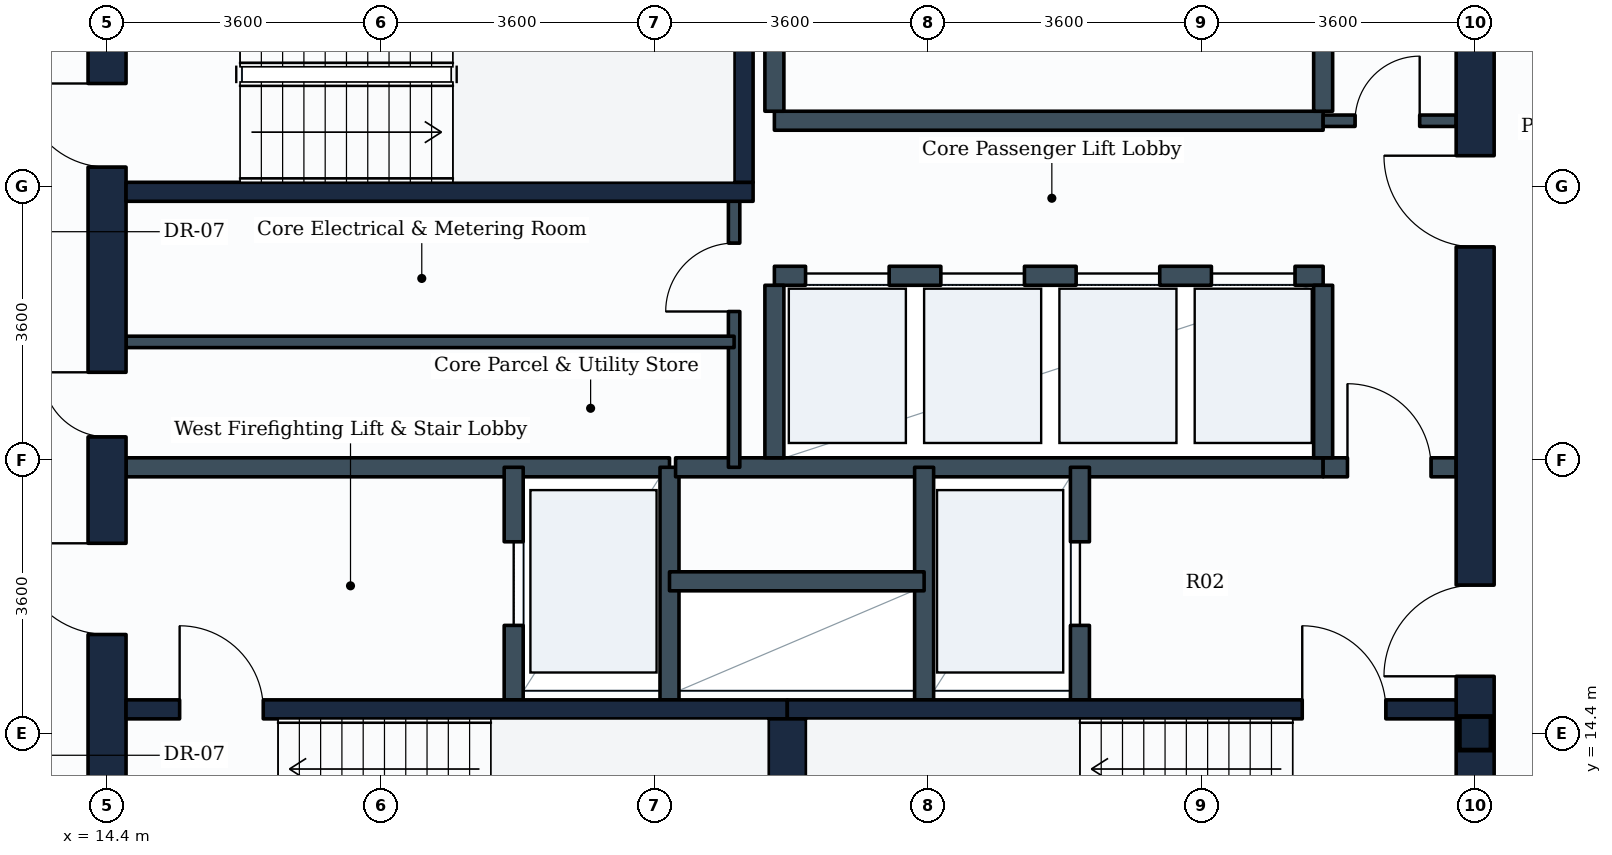
"""IFC4 building model, lengths in metres.
Left out: names, types, materials, properties, quantities, classifications, styles, units other than length and angle.
Written with IfcOpenShell. Run it as: python <this file> out.ifc"""

import sys

from ifc_helpers import new_model, si_unit, direction, frame, frame_2d, origin, origin_2d, place, context, subcontext, project, spatial, rectangle, i_section, extrude, element, fill, save


model = new_model("IFC4")
c1 = context("Model", 3, precision=1e-05, world=origin(), true_north=direction((0.0, 1.0)))
c2 = subcontext(c1, "Body", "Model", "MODEL_VIEW")
j1 = project(units=[si_unit("LENGTHUNIT", "METRE"), si_unit("PLANEANGLEUNIT", "RADIAN")], contexts=[c1])
p1 = place(None, origin())
s1 = spatial("IfcSite", under=j1, at=p1, CompositionType="ELEMENT")
p2 = place(p1, origin())
s2 = spatial("IfcBuilding", under=s1, at=p2, CompositionType="ELEMENT")
p3 = place(p2, frame((0.0, 0.0, 142.8)))
s3 = spatial("IfcBuildingStorey", under=s2, at=p3, CompositionType="ELEMENT", Elevation=142.8)
p4 = place(p3, frame((32.4, 14.4, 0.0), z_axis=(0.0, 0.0, 1.0), x_axis=(1.0, 0.0, 0.0)))
e1 = element("IfcColumn", 1, at=p4, inside=s3, PredefinedType="COLUMN", context=c2, shape_type="SweptSolid", body=[
    extrude(i_section(OverallWidth=0.416, OverallDepth=0.442, WebThickness=0.025, FlangeThickness=0.041, FilletRadius=0.015, at=origin_2d()), origin(), (0.0, 0.0, 1.0), 3.8),
])
p5 = place(p3, frame((14.4, 10.8, 0.0), z_axis=(0.0, 0.0, 1.0), x_axis=(0.0, 1.0, 0.0)))
e2 = element("IfcWall", 2, at=p5, inside=s3, PredefinedType="SHEAR", context=c2, shape_type="SweptSolid", body=[
    extrude(rectangle(XDim=14.4, YDim=0.5, at=frame_2d((7.2, 0.0))), origin(), (0.0, 0.0, 1.0), 3.55),
])
p6 = place(p5, frame((11.05, 0.0, 0.0)))
e3 = element("IfcOpeningElement", 3, at=p6, cuts=e2, PredefinedType="OPENING", context=c2, shape_type="SweptSolid", body=[
    extrude(rectangle(XDim=1.1, YDim=2.1, at=frame_2d((0.55, 1.05))), frame((0.0, 0.26, 0.0), z_axis=(0.0, -1.0, 0.0), x_axis=(1.0, 0.0, 0.0)), (0.0, 0.0, 1.0), 0.52),
])
p7 = place(p5, frame((4.9, 0.0, 0.0)))
e4 = element("IfcOpeningElement", 4, at=p7, cuts=e2, PredefinedType="OPENING", context=c2, shape_type="SweptSolid", body=[
    extrude(rectangle(XDim=1.2, YDim=2.1, at=frame_2d((0.6, 1.05))), frame((0.0, 0.26, 0.0), z_axis=(0.0, -1.0, 0.0), x_axis=(1.0, 0.0, 0.0)), (0.0, 0.0, 1.0), 0.52),
])
p8 = place(p5, frame((7.5, 0.0, 0.0)))
e5 = element("IfcOpeningElement", 5, at=p8, cuts=e2, PredefinedType="OPENING", context=c2, shape_type="SweptSolid", body=[
    extrude(rectangle(XDim=0.85, YDim=2.1, at=frame_2d((0.425, 1.05))), frame((0.0, 0.26, 0.0), z_axis=(0.0, -1.0, 0.0), x_axis=(1.0, 0.0, 0.0)), (0.0, 0.0, 1.0), 0.52),
])
p9 = place(p3, frame((32.4, 10.8, 0.0), z_axis=(0.0, 0.0, 1.0), x_axis=(0.0, 1.0, 0.0)))
e6 = element("IfcWall", 6, at=p9, inside=s3, PredefinedType="SHEAR", context=c2, shape_type="SweptSolid", body=[
    extrude(rectangle(XDim=14.4, YDim=0.5, at=frame_2d((7.2, 0.0))), origin(), (0.0, 0.0, 1.0), 3.55),
])
p10 = place(p9, frame((4.35, 0.0, 0.0)))
e7 = element("IfcOpeningElement", 7, at=p10, cuts=e6, PredefinedType="OPENING", context=c2, shape_type="SweptSolid", body=[
    extrude(rectangle(XDim=1.2, YDim=2.1, at=frame_2d((0.6, 1.05))), frame((0.0, 0.26, 0.0), z_axis=(0.0, -1.0, 0.0), x_axis=(1.0, 0.0, 0.0)), (0.0, 0.0, 1.0), 0.52),
])
p11 = place(p9, frame((10.0, 0.0, 0.0)))
e8 = element("IfcOpeningElement", 8, at=p11, cuts=e6, PredefinedType="OPENING", context=c2, shape_type="SweptSolid", body=[
    extrude(rectangle(XDim=1.2, YDim=2.1, at=frame_2d((0.6, 1.05))), frame((0.0, 0.26, 0.0), z_axis=(0.0, -1.0, 0.0), x_axis=(1.0, 0.0, 0.0)), (0.0, 0.0, 1.0), 0.52),
])
p12 = place(p3, frame((14.65, 14.715, 0.0), z_axis=(0.0, 0.0, 1.0), x_axis=(1.0, 0.0, 0.0)))
e9 = element("IfcWall", 9, at=p12, inside=s3, PredefinedType="SHEAR", context=c2, shape_type="SweptSolid", body=[
    extrude(rectangle(XDim=8.7, YDim=0.25, at=frame_2d((4.35, 0.0))), origin(), (0.0, 0.0, 1.0), 3.55),
])
p13 = place(p12, frame((0.705, 0.0, 0.0)))
e10 = element("IfcOpeningElement", 10, at=p13, cuts=e9, PredefinedType="OPENING", context=c2, shape_type="SweptSolid", body=[
    extrude(rectangle(XDim=1.1, YDim=2.1, at=frame_2d((0.55, 1.05))), frame((0.0, 0.135, 0.0), z_axis=(0.0, -1.0, 0.0), x_axis=(1.0, 0.0, 0.0)), (0.0, 0.0, 1.0), 0.27),
])
p14 = place(p3, frame((23.35, 14.715, 0.0), z_axis=(0.0, 0.0, 1.0), x_axis=(1.0, 0.0, 0.0)))
e11 = element("IfcWall", 11, at=p14, inside=s3, PredefinedType="SHEAR", context=c2, shape_type="SweptSolid", body=[
    extrude(rectangle(XDim=8.8, YDim=0.25, at=frame_2d((4.4, 0.0))), origin(), (0.0, 0.0, 1.0), 3.55),
])
p15 = place(p14, frame((6.775, 0.0, 0.0)))
e12 = element("IfcOpeningElement", 12, at=p15, cuts=e11, PredefinedType="OPENING", context=c2, shape_type="SweptSolid", body=[
    extrude(rectangle(XDim=1.1, YDim=2.1, at=frame_2d((0.55, 1.05))), frame((0.0, 0.135, 0.0), z_axis=(0.0, -1.0, 0.0), x_axis=(1.0, 0.0, 0.0)), (0.0, 0.0, 1.0), 0.27),
])
p16 = place(p3, frame((23.35, 11.75, 0.0), z_axis=(0.0, 0.0, 1.0), x_axis=(0.0, 1.0, 0.0)))
e13 = element("IfcWall", 13, at=p16, inside=s3, PredefinedType="SHEAR", context=c2, shape_type="SweptSolid", body=[
    extrude(rectangle(XDim=2.84, YDim=0.5, at=frame_2d((1.42, 0.0))), origin(), (0.0, 0.0, 1.0), 3.55),
])
p17 = place(p3, frame((14.65, 21.525, 0.0), z_axis=(0.0, 0.0, 1.0), x_axis=(1.0, 0.0, 0.0)))
e14 = element("IfcWall", 14, at=p17, inside=s3, PredefinedType="SHEAR", context=c2, shape_type="SweptSolid", body=[
    extrude(rectangle(XDim=8.25, YDim=0.25, at=frame_2d((4.125, 0.0))), origin(), (0.0, 0.0, 1.0), 3.55),
])
p18 = place(p3, frame((22.775, 21.65, 0.0), z_axis=(0.0, 0.0, 1.0), x_axis=(0.0, 1.0, 0.0)))
e15 = element("IfcWall", 15, at=p18, inside=s3, PredefinedType="SHEAR", context=c2, shape_type="SweptSolid", body=[
    extrude(rectangle(XDim=2.84, YDim=0.25, at=frame_2d((1.42, 0.0))), origin(), (0.0, 0.0, 1.0), 3.55),
])
p19 = place(p3, frame((14.65, 17.9, 0.0), z_axis=(0.0, 0.0, 1.0), x_axis=(1.0, 0.0, 0.0)))
e16 = element("IfcWall", 16, at=p19, inside=s3, PredefinedType="PARTITIONING", context=c2, shape_type="SweptSolid", body=[
    extrude(rectangle(XDim=7.15, YDim=0.25, at=frame_2d((3.575, 0.0))), origin(), (0.0, 0.0, 1.0), 3.535),
])
p20 = place(p3, frame((19.75, 14.84, 0.0), z_axis=(0.0, 0.0, 1.0), x_axis=(0.0, 1.0, 0.0)))
e17 = element("IfcWall", 17, at=p20, inside=s3, PredefinedType="PARTITIONING", context=c2, shape_type="SweptSolid", body=[
    extrude(rectangle(XDim=3.06, YDim=0.25, at=frame_2d((1.53, 0.0))), origin(), (0.0, 0.0, 1.0), 3.535),
])
p21 = place(p20, frame((0.98, 0.0, 0.0)))
e18 = element("IfcOpeningElement", 18, at=p21, cuts=e17, PredefinedType="OPENING", context=c2, shape_type="SweptSolid", body=[
    extrude(rectangle(XDim=1.1, YDim=2.1, at=frame_2d((0.55, 1.05))), frame((0.0, 0.135, 0.0), z_axis=(0.0, -1.0, 0.0), x_axis=(1.0, 0.0, 0.0)), (0.0, 0.0, 1.0), 0.27),
])
p22 = place(p3, frame((21.8, 14.84, 0.0), z_axis=(0.0, 0.0, 1.0), x_axis=(0.0, 1.0, 0.0)))
e19 = element("IfcWall", 19, at=p22, inside=s3, PredefinedType="PARTITIONING", context=c2, shape_type="SweptSolid", body=[
    extrude(rectangle(XDim=3.06, YDim=0.25, at=frame_2d((1.53, 0.0))), origin(), (0.0, 0.0, 1.0), 3.535),
])
p23 = place(p3, frame((21.88, 17.9, 0.0), z_axis=(0.0, 0.0, 1.0), x_axis=(1.0, 0.0, 0.0)))
e20 = element("IfcWall", 20, at=p23, inside=s3, PredefinedType="PARTITIONING", context=c2, shape_type="SweptSolid", body=[
    extrude(rectangle(XDim=8.52, YDim=0.25, at=frame_2d((4.26, 0.0))), origin(), (0.0, 0.0, 1.0), 3.535),
])
p24 = place(p3, frame((30.4, 17.9, 0.0), z_axis=(0.0, 0.0, 1.0), x_axis=(1.0, 0.0, 0.0)))
e21 = element("IfcWall", 21, at=p24, inside=s3, PredefinedType="PARTITIONING", context=c2, shape_type="SweptSolid", body=[
    extrude(rectangle(XDim=1.75, YDim=0.25, at=frame_2d((0.875, 0.0))), origin(), (0.0, 0.0, 1.0), 3.535),
])
p25 = place(p24, frame((0.32, 0.0, 0.0)))
e22 = element("IfcOpeningElement", 22, at=p25, cuts=e21, PredefinedType="OPENING", context=c2, shape_type="SweptSolid", body=[
    extrude(rectangle(XDim=1.1, YDim=2.1, at=frame_2d((0.55, 1.05))), frame((0.0, 0.135, 0.0), z_axis=(0.0, -1.0, 0.0), x_axis=(1.0, 0.0, 0.0)), (0.0, 0.0, 1.0), 0.27),
])
p26 = place(p3, frame((25.15, 14.84, 0.0), z_axis=(0.0, 0.0, 1.0), x_axis=(0.0, 1.0, 0.0)))
e23 = element("IfcWall", 23, at=p26, inside=s3, PredefinedType="PARTITIONING", context=c2, shape_type="SweptSolid", body=[
    extrude(rectangle(XDim=3.06, YDim=0.25, at=frame_2d((1.53, 0.0))), origin(), (0.0, 0.0, 1.0), 3.535),
])
p27 = place(p3, frame((27.2, 14.84, 0.0), z_axis=(0.0, 0.0, 1.0), x_axis=(0.0, 1.0, 0.0)))
e24 = element("IfcWall", 24, at=p27, inside=s3, PredefinedType="PARTITIONING", context=c2, shape_type="SweptSolid", body=[
    extrude(rectangle(XDim=3.06, YDim=0.25, at=frame_2d((1.53, 0.0))), origin(), (0.0, 0.0, 1.0), 3.535),
])
p28 = place(p27, frame((0.98, 0.0, 0.0)))
e25 = element("IfcOpeningElement", 25, at=p28, cuts=e24, PredefinedType="OPENING", context=c2, shape_type="SweptSolid", body=[
    extrude(rectangle(XDim=1.1, YDim=2.1, at=frame_2d((0.55, 1.05))), frame((0.0, 0.135, 0.0), z_axis=(0.0, -1.0, 0.0), x_axis=(1.0, 0.0, 0.0)), (0.0, 0.0, 1.0), 0.27),
])
p29 = place(p3, frame((21.8, 16.4, 0.0), z_axis=(0.0, 0.0, 1.0), x_axis=(1.0, 0.0, 0.0)))
e26 = element("IfcWall", 26, at=p29, inside=s3, PredefinedType="PARTITIONING", context=c2, shape_type="SweptSolid", body=[
    extrude(rectangle(XDim=3.35, YDim=0.25, at=frame_2d((1.675, 0.0))), origin(), (0.0, 0.0, 1.0), 3.535),
])
p30 = place(p3, frame((23.18, 20.42, 0.0), z_axis=(0.0, 0.0, 1.0), x_axis=(1.0, 0.0, 0.0)))
e27 = element("IfcWall", 27, at=p30, inside=s3, PredefinedType="PARTITIONING", context=c2, shape_type="SweptSolid", body=[
    extrude(rectangle(XDim=7.22, YDim=0.25, at=frame_2d((3.61, 0.0))), origin(), (0.0, 0.0, 1.0), 3.535),
])
p31 = place(p30, frame((0.41, 0.0, 0.0)))
e28 = element("IfcOpeningElement", 28, at=p31, cuts=e27, PredefinedType="OPENING", context=c2, shape_type="SweptSolid", body=[
    extrude(rectangle(XDim=1.1, YDim=2.1, at=frame_2d((0.55, 1.05))), frame((0.0, 0.135, 0.0), z_axis=(0.0, -1.0, 0.0), x_axis=(1.0, 0.0, 0.0)), (0.0, 0.0, 1.0), 0.27),
])
p32 = place(p30, frame((2.19, 0.0, 0.0)))
e29 = element("IfcOpeningElement", 29, at=p32, cuts=e27, PredefinedType="OPENING", context=c2, shape_type="SweptSolid", body=[
    extrude(rectangle(XDim=1.1, YDim=2.1, at=frame_2d((0.55, 1.05))), frame((0.0, 0.135, 0.0), z_axis=(0.0, -1.0, 0.0), x_axis=(1.0, 0.0, 0.0)), (0.0, 0.0, 1.0), 0.27),
])
p33 = place(p30, frame((3.97, 0.0, 0.0)))
e30 = element("IfcOpeningElement", 30, at=p33, cuts=e27, PredefinedType="OPENING", context=c2, shape_type="SweptSolid", body=[
    extrude(rectangle(XDim=1.1, YDim=2.1, at=frame_2d((0.55, 1.05))), frame((0.0, 0.135, 0.0), z_axis=(0.0, -1.0, 0.0), x_axis=(1.0, 0.0, 0.0)), (0.0, 0.0, 1.0), 0.27),
])
p34 = place(p30, frame((5.75, 0.0, 0.0)))
e31 = element("IfcOpeningElement", 31, at=p34, cuts=e27, PredefinedType="OPENING", context=c2, shape_type="SweptSolid", body=[
    extrude(rectangle(XDim=1.1, YDim=2.1, at=frame_2d((0.55, 1.05))), frame((0.0, 0.135, 0.0), z_axis=(0.0, -1.0, 0.0), x_axis=(1.0, 0.0, 0.0)), (0.0, 0.0, 1.0), 0.27),
])
for number, where, z_axis, x_axis in (
    (32, (23.18, 18.025, 0.0), (0.0, 0.0, 1.0), (0.0, 1.0, 0.0)),
    (33, (30.4, 18.025, 0.0), (0.0, 0.0, 1.0), (0.0, 1.0, 0.0)),
):
    element("IfcWall", number, at=place(p3, frame(where, z_axis=z_axis, x_axis=x_axis)), inside=s3, PredefinedType="PARTITIONING", context=c2, shape_type="SweptSolid", body=[
        extrude(rectangle(XDim=2.27, YDim=0.25, at=frame_2d((1.135, 0.0))), origin(), (0.0, 0.0, 1.0), 3.535),
    ])
p35 = place(p3, frame((23.18, 22.46, 0.0), z_axis=(0.0, 0.0, 1.0), x_axis=(1.0, 0.0, 0.0)))
e34 = element("IfcWall", 34, at=p35, inside=s3, PredefinedType="PARTITIONING", context=c2, shape_type="SweptSolid", body=[
    extrude(rectangle(XDim=7.22, YDim=0.25, at=frame_2d((3.61, 0.0))), origin(), (0.0, 0.0, 1.0), 3.535),
])
for number, where, z_axis, x_axis in (
    (35, (23.18, 22.585, 0.0), (0.0, 0.0, 1.0), (0.0, 1.0, 0.0)),
    (36, (30.4, 22.585, 0.0), (0.0, 0.0, 1.0), (0.0, 1.0, 0.0)),
):
    element("IfcWall", number, at=place(p3, frame(where, z_axis=z_axis, x_axis=x_axis)), inside=s3, PredefinedType="PARTITIONING", context=c2, shape_type="SweptSolid", body=[
        extrude(rectangle(XDim=2.315, YDim=0.25, at=frame_2d((1.157, 0.0))), origin(), (0.0, 0.0, 1.0), 3.535),
    ])
p36 = place(p3, frame((22.65, 17.9, 0.0), z_axis=(0.0, 0.0, 1.0), x_axis=(0.0, 1.0, 0.0)))
e37 = element("IfcWall", 37, at=p36, inside=s3, PredefinedType="PARTITIONING", context=c2, shape_type="SweptSolid", body=[
    extrude(rectangle(XDim=3.625, YDim=0.15, at=frame_2d((1.812, 0.0))), origin(), (0.0, 0.0, 1.0), 3.535),
])
p37 = place(p36, frame((2.05, 0.0, 0.0)))
e38 = element("IfcOpeningElement", 38, at=p37, cuts=e37, PredefinedType="OPENING", context=c2, shape_type="SweptSolid", body=[
    extrude(rectangle(XDim=0.9, YDim=2.1, at=frame_2d((0.45, 1.05))), frame((0.0, 0.085, 0.0), z_axis=(0.0, -1.0, 0.0), x_axis=(1.0, 0.0, 0.0)), (0.0, 0.0, 1.0), 0.17),
])
p38 = place(p3, frame((14.65, 19.55, 0.0), z_axis=(0.0, 0.0, 1.0), x_axis=(1.0, 0.0, 0.0)))
e39 = element("IfcWall", 39, at=p38, inside=s3, PredefinedType="PARTITIONING", context=c2, shape_type="SweptSolid", body=[
    extrude(rectangle(XDim=8.0, YDim=0.15, at=frame_2d((4.0, 0.0))), origin(), (0.0, 0.0, 1.0), 3.535),
])
p39 = place(p3, frame((30.4, 22.46, 0.0), z_axis=(0.0, 0.0, 1.0), x_axis=(1.0, 0.0, 0.0)))
e40 = element("IfcWall", 40, at=p39, inside=s3, PredefinedType="PARTITIONING", context=c2, shape_type="SweptSolid", body=[
    extrude(rectangle(XDim=1.75, YDim=0.15, at=frame_2d((0.875, 0.0))), origin(), (0.0, 0.0, 1.0), 3.535),
])
p40 = place(p39, frame((0.42, 0.0, 0.0)))
e41 = element("IfcOpeningElement", 41, at=p40, cuts=e40, PredefinedType="OPENING", context=c2, shape_type="SweptSolid", body=[
    extrude(rectangle(XDim=0.85, YDim=2.1, at=frame_2d((0.425, 1.05))), frame((0.0, 0.085, 0.0), z_axis=(0.0, -1.0, 0.0), x_axis=(1.0, 0.0, 0.0)), (0.0, 0.0, 1.0), 0.17),
])
p41 = place(p13, origin())
e42 = element("IfcDoor", 42, at=p41, inside=s3, OperationType="SINGLE_SWING_LEFT", PredefinedType="DOOR", context=c2, shape_type="SweptSolid", body=[
    extrude(rectangle(XDim=1.1, YDim=2.1, at=frame_2d((0.55, 1.05))), frame((0.0, 0.025, 0.0), z_axis=(0.0, -1.0, 0.0), x_axis=(1.0, 0.0, 0.0)), (0.0, 0.0, 1.0), 0.05),
])
fill(e10, e42)
p42 = place(p15, origin())
e43 = element("IfcDoor", 43, at=p42, inside=s3, OperationType="SINGLE_SWING_LEFT", PredefinedType="DOOR", context=c2, shape_type="SweptSolid", body=[
    extrude(rectangle(XDim=1.1, YDim=2.1, at=frame_2d((0.55, 1.05))), frame((0.0, 0.025, 0.0), z_axis=(0.0, -1.0, 0.0), x_axis=(1.0, 0.0, 0.0)), (0.0, 0.0, 1.0), 0.05),
])
fill(e12, e43)
p43 = place(p6, origin())
e44 = element("IfcDoor", 44, at=p43, inside=s3, OperationType="SINGLE_SWING_RIGHT", PredefinedType="DOOR", context=c2, shape_type="SweptSolid", body=[
    extrude(rectangle(XDim=1.1, YDim=2.1, at=frame_2d((0.55, 1.05))), frame((0.0, 0.025, 0.0), z_axis=(0.0, -1.0, 0.0), x_axis=(1.0, 0.0, 0.0)), (0.0, 0.0, 1.0), 0.05),
])
fill(e3, e44)
p44 = place(p21, origin())
e45 = element("IfcDoor", 45, at=p44, inside=s3, OperationType="SLIDING_TO_LEFT", PredefinedType="DOOR", context=c2, shape_type="SweptSolid", body=[
    extrude(rectangle(XDim=1.1, YDim=2.1, at=frame_2d((0.55, 1.05))), frame((0.0, 0.025, 0.0), z_axis=(0.0, -1.0, 0.0), x_axis=(1.0, 0.0, 0.0)), (0.0, 0.0, 1.0), 0.05),
])
fill(e18, e45)
p45 = place(p28, origin())
e46 = element("IfcDoor", 46, at=p45, inside=s3, OperationType="SLIDING_TO_LEFT", PredefinedType="DOOR", context=c2, shape_type="SweptSolid", body=[
    extrude(rectangle(XDim=1.1, YDim=2.1, at=frame_2d((0.55, 1.05))), frame((0.0, 0.025, 0.0), z_axis=(0.0, -1.0, 0.0), x_axis=(1.0, 0.0, 0.0)), (0.0, 0.0, 1.0), 0.05),
])
fill(e25, e46)
p46 = place(p7, origin())
e47 = element("IfcDoor", 47, at=p46, inside=s3, OperationType="SINGLE_SWING_RIGHT", PredefinedType="DOOR", context=c2, shape_type="SweptSolid", body=[
    extrude(rectangle(XDim=1.2, YDim=2.1, at=frame_2d((0.6, 1.05))), frame((0.0, 0.025, 0.0), z_axis=(0.0, -1.0, 0.0), x_axis=(1.0, 0.0, 0.0)), (0.0, 0.0, 1.0), 0.05),
])
fill(e4, e47)
p47 = place(p10, origin())
e48 = element("IfcDoor", 48, at=p47, inside=s3, OperationType="SINGLE_SWING_LEFT", PredefinedType="DOOR", context=c2, shape_type="SweptSolid", body=[
    extrude(rectangle(XDim=1.2, YDim=2.1, at=frame_2d((0.6, 1.05))), frame((0.0, 0.025, 0.0), z_axis=(0.0, -1.0, 0.0), x_axis=(1.0, 0.0, 0.0)), (0.0, 0.0, 1.0), 0.05),
])
fill(e7, e48)
p48 = place(p25, origin())
e49 = element("IfcDoor", 49, at=p48, inside=s3, OperationType="SINGLE_SWING_LEFT", PredefinedType="DOOR", context=c2, shape_type="SweptSolid", body=[
    extrude(rectangle(XDim=1.1, YDim=2.1, at=frame_2d((0.55, 1.05))), frame((0.0, 0.025, 0.0), z_axis=(0.0, -1.0, 0.0), x_axis=(1.0, 0.0, 0.0)), (0.0, 0.0, 1.0), 0.05),
])
fill(e22, e49)
p49 = place(p31, origin())
e50 = element("IfcDoor", 50, at=p49, inside=s3, OperationType="SLIDING_TO_LEFT", PredefinedType="DOOR", context=c2, shape_type="SweptSolid", body=[
    extrude(rectangle(XDim=1.1, YDim=2.1, at=frame_2d((0.55, 1.05))), frame((0.0, 0.025, 0.0), z_axis=(0.0, -1.0, 0.0), x_axis=(1.0, 0.0, 0.0)), (0.0, 0.0, 1.0), 0.05),
])
fill(e28, e50)
p50 = place(p32, origin())
e51 = element("IfcDoor", 51, at=p50, inside=s3, OperationType="SLIDING_TO_LEFT", PredefinedType="DOOR", context=c2, shape_type="SweptSolid", body=[
    extrude(rectangle(XDim=1.1, YDim=2.1, at=frame_2d((0.55, 1.05))), frame((0.0, 0.025, 0.0), z_axis=(0.0, -1.0, 0.0), x_axis=(1.0, 0.0, 0.0)), (0.0, 0.0, 1.0), 0.05),
])
fill(e29, e51)
p51 = place(p33, origin())
e52 = element("IfcDoor", 52, at=p51, inside=s3, OperationType="SLIDING_TO_LEFT", PredefinedType="DOOR", context=c2, shape_type="SweptSolid", body=[
    extrude(rectangle(XDim=1.1, YDim=2.1, at=frame_2d((0.55, 1.05))), frame((0.0, 0.025, 0.0), z_axis=(0.0, -1.0, 0.0), x_axis=(1.0, 0.0, 0.0)), (0.0, 0.0, 1.0), 0.05),
])
fill(e30, e52)
p52 = place(p34, origin())
e53 = element("IfcDoor", 53, at=p52, inside=s3, OperationType="SLIDING_TO_LEFT", PredefinedType="DOOR", context=c2, shape_type="SweptSolid", body=[
    extrude(rectangle(XDim=1.1, YDim=2.1, at=frame_2d((0.55, 1.05))), frame((0.0, 0.025, 0.0), z_axis=(0.0, -1.0, 0.0), x_axis=(1.0, 0.0, 0.0)), (0.0, 0.0, 1.0), 0.05),
])
fill(e31, e53)
p53 = place(p11, origin())
e54 = element("IfcDoor", 54, at=p53, inside=s3, OperationType="SINGLE_SWING_RIGHT", PredefinedType="DOOR", context=c2, shape_type="SweptSolid", body=[
    extrude(rectangle(XDim=1.2, YDim=2.1, at=frame_2d((0.6, 1.05))), frame((0.0, 0.025, 0.0), z_axis=(0.0, -1.0, 0.0), x_axis=(1.0, 0.0, 0.0)), (0.0, 0.0, 1.0), 0.05),
])
fill(e8, e54)
p54 = place(p8, origin())
e55 = element("IfcDoor", 55, at=p54, inside=s3, OperationType="SINGLE_SWING_RIGHT", PredefinedType="DOOR", context=c2, shape_type="SweptSolid", body=[
    extrude(rectangle(XDim=0.85, YDim=2.1, at=frame_2d((0.425, 1.05))), frame((0.0, 0.025, 0.0), z_axis=(0.0, -1.0, 0.0), x_axis=(1.0, 0.0, 0.0)), (0.0, 0.0, 1.0), 0.05),
])
fill(e5, e55)
p55 = place(p37, origin())
e56 = element("IfcDoor", 56, at=p55, inside=s3, OperationType="SINGLE_SWING_LEFT", PredefinedType="DOOR", context=c2, shape_type="SweptSolid", body=[
    extrude(rectangle(XDim=0.9, YDim=2.1, at=frame_2d((0.45, 1.05))), frame((0.0, 0.025, 0.0), z_axis=(0.0, -1.0, 0.0), x_axis=(1.0, 0.0, 0.0)), (0.0, 0.0, 1.0), 0.05),
])
fill(e38, e56)
p56 = place(p40, origin())
e57 = element("IfcDoor", 57, at=p56, inside=s3, OperationType="SINGLE_SWING_RIGHT", PredefinedType="DOOR", context=c2, shape_type="SweptSolid", body=[
    extrude(rectangle(XDim=0.85, YDim=2.1, at=frame_2d((0.425, 1.05))), frame((0.0, 0.025, 0.0), z_axis=(0.0, -1.0, 0.0), x_axis=(1.0, 0.0, 0.0)), (0.0, 0.0, 1.0), 0.05),
])
fill(e41, e57)
save(model, sys.argv[1])
